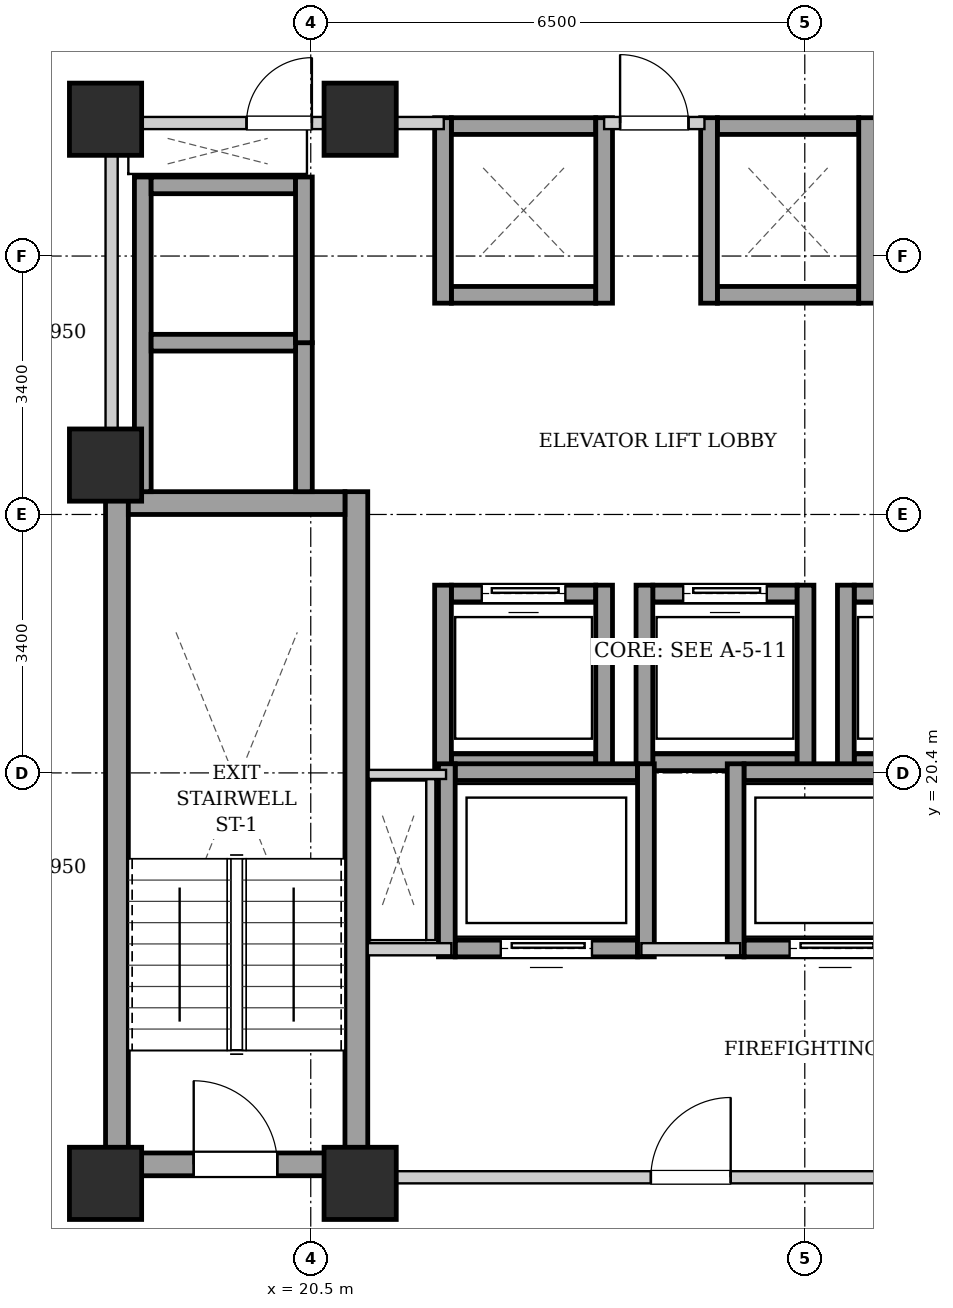
"""IFC4 building model, lengths in metres.
Left out: names, types, materials, properties, quantities, classifications, styles, units other than length and angle.
Written with IfcOpenShell. Run it as: python <this file> out.ifc"""

import sys

from ifc_helpers import new_model, si_unit, direction, frame, frame_2d, origin, origin_2d, place, context, subcontext, project, spatial, rectangle, extrude, element, fill, save


model = new_model("IFC4")
c1 = context("Model", 3, precision=1e-05, world=origin(), true_north=direction((0.0, 1.0)))
c2 = subcontext(c1, "Body", "Model", "MODEL_VIEW")
j1 = project(units=[si_unit("LENGTHUNIT", "METRE"), si_unit("PLANEANGLEUNIT", "RADIAN")], contexts=[c1])
p1 = place(None, origin())
s1 = spatial("IfcSite", under=j1, at=p1, CompositionType="ELEMENT")
p2 = place(p1, origin())
s2 = spatial("IfcBuilding", under=s1, at=p2, CompositionType="ELEMENT")
p3 = place(p2, frame((0.0, 0.0, 127.65)))
s3 = spatial("IfcBuildingStorey", under=s2, at=p3, CompositionType="ELEMENT", Elevation=127.65)
for number, where, z_axis, x_axis in (
    (1, (17.8, 15.0, 0.0), (0.0, 0.0, 1.0), (1.0, 0.0, 0.0)),
    (2, (21.15, 15.0, 0.0), (0.0, 0.0, 1.0), (1.0, 0.0, 0.0)),
    (3, (17.8, 29.0, 0.0), (0.0, 0.0, 1.0), (1.0, 0.0, 0.0)),
    (4, (21.15, 29.0, 0.0), (0.0, 0.0, 1.0), (1.0, 0.0, 0.0)),
    (5, (17.8, 24.45, 0.0), (0.0, 0.0, 1.0), (1.0, 0.0, 0.0)),
):
    element("IfcColumn", number, at=place(p3, frame(where, z_axis=z_axis, x_axis=x_axis)), inside=s3, PredefinedType="COLUMN", context=c2, shape_type="SweptSolid", body=[
        extrude(rectangle(XDim=0.95, YDim=0.95, at=origin_2d()), origin(), (0.0, 0.0, 1.0), 3.25),
    ])
for number, where, z_axis, x_axis in (
    (6, (17.95, 15.1, 0.0), (0.0, 0.0, 1.0), (0.0, 1.0, 0.0)),
    (7, (21.1, 15.1, 0.0), (0.0, 0.0, 1.0), (0.0, 1.0, 0.0)),
):
    element("IfcWall", number, at=place(p3, frame(where, z_axis=z_axis, x_axis=x_axis)), inside=s3, PredefinedType="SHEAR", context=c2, shape_type="SweptSolid", body=[
        extrude(rectangle(XDim=9.0, YDim=0.3, at=frame_2d((4.5, 0.0))), origin(), (0.0, 0.0, 1.0), 2.99),
    ])
p4 = place(p3, frame((18.1, 23.95, 0.0), z_axis=(0.0, 0.0, 1.0), x_axis=(1.0, 0.0, 0.0)))
e8 = element("IfcWall", 8, at=p4, inside=s3, PredefinedType="SHEAR", context=c2, shape_type="SweptSolid", body=[
    extrude(rectangle(XDim=2.85, YDim=0.3, at=frame_2d((1.425, 0.0))), origin(), (0.0, 0.0, 1.0), 2.99),
])
p5 = place(p3, frame((18.1, 15.25, 0.0), z_axis=(0.0, 0.0, 1.0), x_axis=(1.0, 0.0, 0.0)))
e9 = element("IfcWall", 9, at=p5, inside=s3, PredefinedType="SHEAR", context=c2, shape_type="SweptSolid", body=[
    extrude(rectangle(XDim=2.85, YDim=0.3, at=frame_2d((1.425, 0.0))), origin(), (0.0, 0.0, 1.0), 2.99),
])
p6 = place(p5, frame((0.86, 0.0, 0.0)))
e10 = element("IfcOpeningElement", 10, at=p6, cuts=e9, PredefinedType="OPENING", context=c2, shape_type="SweptSolid", body=[
    extrude(rectangle(XDim=1.1, YDim=2.05, at=frame_2d((0.55, 1.025))), frame((0.0, 0.16, 0.0), z_axis=(0.0, -1.0, 0.0), x_axis=(1.0, 0.0, 0.0)), (0.0, 0.0, 1.0), 0.32),
])
for number, where, z_axis, x_axis in (
    (11, (22.35, 26.69, 0.0), (0.0, 0.0, 1.0), (1.0, 0.0, 0.0)),
    (12, (22.35, 28.91, 0.0), (0.0, 0.0, 1.0), (1.0, 0.0, 0.0)),
):
    element("IfcWall", number, at=place(p3, frame(where, z_axis=z_axis, x_axis=x_axis)), inside=s3, PredefinedType="SHEAR", context=c2, shape_type="SweptSolid", body=[
        extrude(rectangle(XDim=1.9, YDim=0.22, at=frame_2d((0.95, 0.0))), origin(), (0.0, 0.0, 1.0), 2.99),
    ])
for number, where, z_axis, x_axis in (
    (13, (22.24, 26.58, 0.0), (0.0, 0.0, 1.0), (0.0, 1.0, 0.0)),
    (14, (24.36, 26.58, 0.0), (0.0, 0.0, 1.0), (0.0, 1.0, 0.0)),
):
    element("IfcWall", number, at=place(p3, frame(where, z_axis=z_axis, x_axis=x_axis)), inside=s3, PredefinedType="SHEAR", context=c2, shape_type="SweptSolid", body=[
        extrude(rectangle(XDim=2.44, YDim=0.22, at=frame_2d((1.22, 0.0))), origin(), (0.0, 0.0, 1.0), 2.99),
    ])
for number, where, z_axis, x_axis in (
    (15, (25.85, 26.69, 0.0), (0.0, 0.0, 1.0), (1.0, 0.0, 0.0)),
    (16, (25.85, 28.91, 0.0), (0.0, 0.0, 1.0), (1.0, 0.0, 0.0)),
):
    element("IfcWall", number, at=place(p3, frame(where, z_axis=z_axis, x_axis=x_axis)), inside=s3, PredefinedType="SHEAR", context=c2, shape_type="SweptSolid", body=[
        extrude(rectangle(XDim=1.86, YDim=0.22, at=frame_2d((0.93, 0.0))), origin(), (0.0, 0.0, 1.0), 2.99),
    ])
for number, where, z_axis, x_axis in (
    (17, (25.74, 26.58, 0.0), (0.0, 0.0, 1.0), (0.0, 1.0, 0.0)),
    (18, (27.82, 26.58, 0.0), (0.0, 0.0, 1.0), (0.0, 1.0, 0.0)),
):
    element("IfcWall", number, at=place(p3, frame(where, z_axis=z_axis, x_axis=x_axis)), inside=s3, PredefinedType="SHEAR", context=c2, shape_type="SweptSolid", body=[
        extrude(rectangle(XDim=2.44, YDim=0.22, at=frame_2d((1.22, 0.0))), origin(), (0.0, 0.0, 1.0), 2.99),
    ])
p7 = place(p3, frame((22.35, 20.54, 0.0), z_axis=(0.0, 0.0, 1.0), x_axis=(1.0, 0.0, 0.0)))
e19 = element("IfcWall", 19, at=p7, inside=s3, PredefinedType="SHEAR", context=c2, shape_type="SweptSolid", body=[
    extrude(rectangle(XDim=1.9, YDim=0.22, at=frame_2d((0.95, 0.0))), origin(), (0.0, 0.0, 1.0), 2.99),
])
p8 = place(p3, frame((22.35, 22.76, 0.0), z_axis=(0.0, 0.0, 1.0), x_axis=(1.0, 0.0, 0.0)))
e20 = element("IfcWall", 20, at=p8, inside=s3, PredefinedType="SHEAR", context=c2, shape_type="SweptSolid", body=[
    extrude(rectangle(XDim=1.9, YDim=0.22, at=frame_2d((0.95, 0.0))), origin(), (0.0, 0.0, 1.0), 2.99),
])
p9 = place(p8, frame((0.4, 0.0, 0.0)))
e21 = element("IfcOpeningElement", 21, at=p9, cuts=e20, PredefinedType="OPENING", context=c2, shape_type="SweptSolid", body=[
    extrude(rectangle(XDim=1.1, YDim=2.15, at=frame_2d((0.55, 1.075))), frame((0.0, 0.12, 0.0), z_axis=(0.0, -1.0, 0.0), x_axis=(1.0, 0.0, 0.0)), (0.0, 0.0, 1.0), 0.24),
])
for number, where, z_axis, x_axis in (
    (22, (22.24, 20.43, 0.0), (0.0, 0.0, 1.0), (0.0, 1.0, 0.0)),
    (23, (24.36, 20.43, 0.0), (0.0, 0.0, 1.0), (0.0, 1.0, 0.0)),
):
    element("IfcWall", number, at=place(p3, frame(where, z_axis=z_axis, x_axis=x_axis)), inside=s3, PredefinedType="SHEAR", context=c2, shape_type="SweptSolid", body=[
        extrude(rectangle(XDim=2.44, YDim=0.22, at=frame_2d((1.22, 0.0))), origin(), (0.0, 0.0, 1.0), 2.99),
    ])
p10 = place(p3, frame((25.0, 20.54, 0.0), z_axis=(0.0, 0.0, 1.0), x_axis=(1.0, 0.0, 0.0)))
e24 = element("IfcWall", 24, at=p10, inside=s3, PredefinedType="SHEAR", context=c2, shape_type="SweptSolid", body=[
    extrude(rectangle(XDim=1.9, YDim=0.22, at=frame_2d((0.95, 0.0))), origin(), (0.0, 0.0, 1.0), 2.99),
])
p11 = place(p3, frame((25.0, 22.76, 0.0), z_axis=(0.0, 0.0, 1.0), x_axis=(1.0, 0.0, 0.0)))
e25 = element("IfcWall", 25, at=p11, inside=s3, PredefinedType="SHEAR", context=c2, shape_type="SweptSolid", body=[
    extrude(rectangle(XDim=1.9, YDim=0.22, at=frame_2d((0.95, 0.0))), origin(), (0.0, 0.0, 1.0), 2.99),
])
p12 = place(p11, frame((0.4, 0.0, 0.0)))
e26 = element("IfcOpeningElement", 26, at=p12, cuts=e25, PredefinedType="OPENING", context=c2, shape_type="SweptSolid", body=[
    extrude(rectangle(XDim=1.1, YDim=2.15, at=frame_2d((0.55, 1.075))), frame((0.0, 0.12, 0.0), z_axis=(0.0, -1.0, 0.0), x_axis=(1.0, 0.0, 0.0)), (0.0, 0.0, 1.0), 0.24),
])
for number, where, z_axis, x_axis in (
    (27, (24.89, 20.43, 0.0), (0.0, 0.0, 1.0), (0.0, 1.0, 0.0)),
    (28, (27.01, 20.43, 0.0), (0.0, 0.0, 1.0), (0.0, 1.0, 0.0)),
):
    element("IfcWall", number, at=place(p3, frame(where, z_axis=z_axis, x_axis=x_axis)), inside=s3, PredefinedType="SHEAR", context=c2, shape_type="SweptSolid", body=[
        extrude(rectangle(XDim=2.44, YDim=0.22, at=frame_2d((1.22, 0.0))), origin(), (0.0, 0.0, 1.0), 2.99),
    ])
p13 = place(p3, frame((27.65, 20.54, 0.0), z_axis=(0.0, 0.0, 1.0), x_axis=(1.0, 0.0, 0.0)))
e29 = element("IfcWall", 29, at=p13, inside=s3, PredefinedType="SHEAR", context=c2, shape_type="SweptSolid", body=[
    extrude(rectangle(XDim=1.9, YDim=0.22, at=frame_2d((0.95, 0.0))), origin(), (0.0, 0.0, 1.0), 2.99),
])
p14 = place(p3, frame((27.65, 22.76, 0.0), z_axis=(0.0, 0.0, 1.0), x_axis=(1.0, 0.0, 0.0)))
e30 = element("IfcWall", 30, at=p14, inside=s3, PredefinedType="SHEAR", context=c2, shape_type="SweptSolid", body=[
    extrude(rectangle(XDim=1.9, YDim=0.22, at=frame_2d((0.95, 0.0))), origin(), (0.0, 0.0, 1.0), 2.99),
])
p15 = place(p14, frame((0.4, 0.0, 0.0)))
e31 = element("IfcOpeningElement", 31, at=p15, cuts=e30, PredefinedType="OPENING", context=c2, shape_type="SweptSolid", body=[
    extrude(rectangle(XDim=1.1, YDim=2.15, at=frame_2d((0.55, 1.075))), frame((0.0, 0.12, 0.0), z_axis=(0.0, -1.0, 0.0), x_axis=(1.0, 0.0, 0.0)), (0.0, 0.0, 1.0), 0.24),
])
p16 = place(p3, frame((27.54, 20.43, 0.0), z_axis=(0.0, 0.0, 1.0), x_axis=(0.0, 1.0, 0.0)))
e32 = element("IfcWall", 32, at=p16, inside=s3, PredefinedType="SHEAR", context=c2, shape_type="SweptSolid", body=[
    extrude(rectangle(XDim=2.44, YDim=0.22, at=frame_2d((1.22, 0.0))), origin(), (0.0, 0.0, 1.0), 2.99),
])
p17 = place(p3, frame((18.29, 24.1, 0.0), z_axis=(0.0, 0.0, 1.0), x_axis=(0.0, 1.0, 0.0)))
e33 = element("IfcWall", 33, at=p17, inside=s3, PredefinedType="SHEAR", context=c2, shape_type="SweptSolid", body=[
    extrude(rectangle(XDim=4.14, YDim=0.22, at=frame_2d((2.07, 0.0))), origin(), (0.0, 0.0, 1.0), 2.99),
])
p18 = place(p3, frame((20.41, 24.1, 0.0), z_axis=(0.0, 0.0, 1.0), x_axis=(0.0, 1.0, 0.0)))
e34 = element("IfcWall", 34, at=p18, inside=s3, PredefinedType="SHEAR", context=c2, shape_type="SweptSolid", body=[
    extrude(rectangle(XDim=1.96, YDim=0.22, at=frame_2d((0.98, 0.0))), origin(), (0.0, 0.0, 1.0), 2.99),
])
for number, where, z_axis, x_axis in (
    (35, (18.4, 26.06, 0.0), (0.0, 0.0, 1.0), (1.0, 0.0, 0.0)),
    (36, (18.4, 28.13, 0.0), (0.0, 0.0, 1.0), (1.0, 0.0, 0.0)),
):
    element("IfcWall", number, at=place(p3, frame(where, z_axis=z_axis, x_axis=x_axis)), inside=s3, PredefinedType="SHEAR", context=c2, shape_type="SweptSolid", body=[
        extrude(rectangle(XDim=1.9, YDim=0.22, at=frame_2d((0.95, 0.0))), origin(), (0.0, 0.0, 1.0), 2.99),
    ])
p19 = place(p3, frame((20.41, 26.06, 0.0), z_axis=(0.0, 0.0, 1.0), x_axis=(0.0, 1.0, 0.0)))
e37 = element("IfcWall", 37, at=p19, inside=s3, PredefinedType="SHEAR", context=c2, shape_type="SweptSolid", body=[
    extrude(rectangle(XDim=2.18, YDim=0.22, at=frame_2d((1.09, 0.0))), origin(), (0.0, 0.0, 1.0), 2.99),
])
p20 = place(p3, frame((22.4, 18.09, 0.0), z_axis=(0.0, 0.0, 1.0), x_axis=(1.0, 0.0, 0.0)))
e38 = element("IfcWall", 38, at=p20, inside=s3, PredefinedType="SHEAR", context=c2, shape_type="SweptSolid", body=[
    extrude(rectangle(XDim=2.4, YDim=0.22, at=frame_2d((1.2, 0.0))), origin(), (0.0, 0.0, 1.0), 2.99),
])
p21 = place(p20, frame((0.6, 0.0, 0.0)))
e39 = element("IfcOpeningElement", 39, at=p21, cuts=e38, PredefinedType="OPENING", context=c2, shape_type="SweptSolid", body=[
    extrude(rectangle(XDim=1.2, YDim=2.15, at=frame_2d((0.6, 1.075))), frame((0.0, 0.12, 0.0), z_axis=(0.0, -1.0, 0.0), x_axis=(1.0, 0.0, 0.0)), (0.0, 0.0, 1.0), 0.24),
])
p22 = place(p3, frame((22.4, 20.41, 0.0), z_axis=(0.0, 0.0, 1.0), x_axis=(1.0, 0.0, 0.0)))
e40 = element("IfcWall", 40, at=p22, inside=s3, PredefinedType="SHEAR", context=c2, shape_type="SweptSolid", body=[
    extrude(rectangle(XDim=2.4, YDim=0.22, at=frame_2d((1.2, 0.0))), origin(), (0.0, 0.0, 1.0), 2.99),
])
for number, where, z_axis, x_axis in (
    (41, (22.29, 17.98, 0.0), (0.0, 0.0, 1.0), (0.0, 1.0, 0.0)),
    (42, (24.91, 17.98, 0.0), (0.0, 0.0, 1.0), (0.0, 1.0, 0.0)),
):
    element("IfcWall", number, at=place(p3, frame(where, z_axis=z_axis, x_axis=x_axis)), inside=s3, PredefinedType="SHEAR", context=c2, shape_type="SweptSolid", body=[
        extrude(rectangle(XDim=2.54, YDim=0.22, at=frame_2d((1.27, 0.0))), origin(), (0.0, 0.0, 1.0), 2.99),
    ])
p23 = place(p3, frame((26.2, 18.09, 0.0), z_axis=(0.0, 0.0, 1.0), x_axis=(1.0, 0.0, 0.0)))
e43 = element("IfcWall", 43, at=p23, inside=s3, PredefinedType="SHEAR", context=c2, shape_type="SweptSolid", body=[
    extrude(rectangle(XDim=2.4, YDim=0.22, at=frame_2d((1.2, 0.0))), origin(), (0.0, 0.0, 1.0), 2.99),
])
p24 = place(p23, frame((0.6, 0.0, 0.0)))
e44 = element("IfcOpeningElement", 44, at=p24, cuts=e43, PredefinedType="OPENING", context=c2, shape_type="SweptSolid", body=[
    extrude(rectangle(XDim=1.2, YDim=2.15, at=frame_2d((0.6, 1.075))), frame((0.0, 0.12, 0.0), z_axis=(0.0, -1.0, 0.0), x_axis=(1.0, 0.0, 0.0)), (0.0, 0.0, 1.0), 0.24),
])
p25 = place(p3, frame((26.2, 20.41, 0.0), z_axis=(0.0, 0.0, 1.0), x_axis=(1.0, 0.0, 0.0)))
e45 = element("IfcWall", 45, at=p25, inside=s3, PredefinedType="SHEAR", context=c2, shape_type="SweptSolid", body=[
    extrude(rectangle(XDim=2.4, YDim=0.22, at=frame_2d((1.2, 0.0))), origin(), (0.0, 0.0, 1.0), 2.99),
])
p26 = place(p3, frame((26.09, 17.98, 0.0), z_axis=(0.0, 0.0, 1.0), x_axis=(0.0, 1.0, 0.0)))
e46 = element("IfcWall", 46, at=p26, inside=s3, PredefinedType="SHEAR", context=c2, shape_type="SweptSolid", body=[
    extrude(rectangle(XDim=2.54, YDim=0.22, at=frame_2d((1.27, 0.0))), origin(), (0.0, 0.0, 1.0), 2.99),
])
p27 = place(p3, frame((21.25, 15.08, 0.0), z_axis=(0.0, 0.0, 1.0), x_axis=(1.0, 0.0, 0.0)))
e47 = element("IfcWall", 47, at=p27, inside=s3, PredefinedType="PARTITIONING", context=c2, shape_type="SweptSolid", body=[
    extrude(rectangle(XDim=8.5, YDim=0.16, at=frame_2d((4.25, 0.0))), origin(), (0.0, 0.0, 1.0), 2.426),
])
p28 = place(p27, frame((3.725, 0.0, 0.0)))
e48 = element("IfcOpeningElement", 48, at=p28, cuts=e47, PredefinedType="OPENING", context=c2, shape_type="SweptSolid", body=[
    extrude(rectangle(XDim=1.05, YDim=2.05, at=frame_2d((0.525, 1.025))), frame((0.0, 0.09, 0.0), z_axis=(0.0, -1.0, 0.0), x_axis=(1.0, 0.0, 0.0)), (0.0, 0.0, 1.0), 0.18),
])
p29 = place(p3, frame((21.25, 18.08, 0.0), z_axis=(0.0, 0.0, 1.0), x_axis=(1.0, 0.0, 0.0)))
e49 = element("IfcWall", 49, at=p29, inside=s3, PredefinedType="PARTITIONING", context=c2, shape_type="SweptSolid", body=[
    extrude(rectangle(XDim=1.1, YDim=0.16, at=frame_2d((0.55, 0.0))), origin(), (0.0, 0.0, 1.0), 2.99),
])
p30 = place(p3, frame((24.85, 18.08, 0.0), z_axis=(0.0, 0.0, 1.0), x_axis=(1.0, 0.0, 0.0)))
e50 = element("IfcWall", 50, at=p30, inside=s3, PredefinedType="PARTITIONING", context=c2, shape_type="SweptSolid", body=[
    extrude(rectangle(XDim=1.3, YDim=0.16, at=frame_2d((0.65, 0.0))), origin(), (0.0, 0.0, 1.0), 2.99),
])
p31 = place(p3, frame((17.88, 24.12, 0.0), z_axis=(0.0, 0.0, 1.0), x_axis=(0.0, 1.0, 0.0)))
e51 = element("IfcWall", 51, at=p31, inside=s3, PredefinedType="PARTITIONING", context=c2, shape_type="SweptSolid", body=[
    extrude(rectangle(XDim=4.76, YDim=0.16, at=frame_2d((2.38, 0.0))), origin(), (0.0, 0.0, 1.0), 2.325),
])
p32 = place(p3, frame((24.36, 28.95, 0.0), z_axis=(0.0, 0.0, 1.0), x_axis=(1.0, 0.0, 0.0)))
e52 = element("IfcWall", 52, at=p32, inside=s3, PredefinedType="PARTITIONING", context=c2, shape_type="SweptSolid", body=[
    extrude(rectangle(XDim=1.32, YDim=0.16, at=frame_2d((0.66, 0.0))), origin(), (0.0, 0.0, 1.0), 2.426),
])
p33 = place(p32, frame((0.21, 0.0, 0.0)))
e53 = element("IfcOpeningElement", 53, at=p33, cuts=e52, PredefinedType="OPENING", context=c2, shape_type="SweptSolid", body=[
    extrude(rectangle(XDim=0.9, YDim=2.05, at=frame_2d((0.45, 1.025))), frame((0.0, 0.09, 0.0), z_axis=(0.0, -1.0, 0.0), x_axis=(1.0, 0.0, 0.0)), (0.0, 0.0, 1.0), 0.18),
])
p34 = place(p3, frame((17.96, 28.95, 0.0), z_axis=(0.0, 0.0, 1.0), x_axis=(1.0, 0.0, 0.0)))
e54 = element("IfcWall", 54, at=p34, inside=s3, PredefinedType="PARTITIONING", context=c2, shape_type="SweptSolid", body=[
    extrude(rectangle(XDim=4.29, YDim=0.16, at=frame_2d((2.145, 0.0))), origin(), (0.0, 0.0, 1.0), 2.426),
])
p35 = place(p34, frame((1.695, 0.0, 0.0)))
e55 = element("IfcOpeningElement", 55, at=p35, cuts=e54, PredefinedType="OPENING", context=c2, shape_type="SweptSolid", body=[
    extrude(rectangle(XDim=0.86, YDim=2.05, at=frame_2d((0.43, 1.025))), frame((0.0, 0.09, 0.0), z_axis=(0.0, -1.0, 0.0), x_axis=(1.0, 0.0, 0.0)), (0.0, 0.0, 1.0), 0.18),
])
p36 = place(p3, frame((22.08, 18.2, 0.0), z_axis=(0.0, 0.0, 1.0), x_axis=(0.0, 1.0, 0.0)))
e56 = element("IfcWall", 56, at=p36, inside=s3, PredefinedType="PARTITIONING", context=c2, shape_type="SweptSolid", body=[
    extrude(rectangle(XDim=2.12, YDim=0.12, at=frame_2d((1.06, 0.0))), origin(), (0.0, 0.0, 1.0), 2.99),
])
p37 = place(p3, frame((22.28, 20.38, 0.0), z_axis=(0.0, 0.0, 1.0), x_axis=(-1.0, 0.0, 0.0)))
e57 = element("IfcWall", 57, at=p37, inside=s3, PredefinedType="PARTITIONING", context=c2, shape_type="SweptSolid", body=[
    extrude(rectangle(XDim=1.02, YDim=0.12, at=frame_2d((0.51, 0.0))), origin(), (0.0, 0.0, 1.0), 2.99),
])
p38 = place(p6, origin())
e58 = element("IfcDoor", 58, at=p38, inside=s3, OperationType="SINGLE_SWING_LEFT", PredefinedType="DOOR", context=c2, shape_type="SweptSolid", body=[
    extrude(rectangle(XDim=1.1, YDim=2.05, at=frame_2d((0.55, 1.025))), frame((0.0, 0.025, 0.0), z_axis=(0.0, -1.0, 0.0), x_axis=(1.0, 0.0, 0.0)), (0.0, 0.0, 1.0), 0.05),
])
fill(e10, e58)
p39 = place(p9, origin())
e59 = element("IfcDoor", 59, at=p39, inside=s3, OperationType="SLIDING_TO_LEFT", PredefinedType="DOOR", context=c2, shape_type="SweptSolid", body=[
    extrude(rectangle(XDim=1.1, YDim=2.15, at=frame_2d((0.55, 1.075))), frame((0.0, 0.025, 0.0), z_axis=(0.0, -1.0, 0.0), x_axis=(1.0, 0.0, 0.0)), (0.0, 0.0, 1.0), 0.05),
])
fill(e21, e59)
p40 = place(p12, origin())
e60 = element("IfcDoor", 60, at=p40, inside=s3, OperationType="SLIDING_TO_LEFT", PredefinedType="DOOR", context=c2, shape_type="SweptSolid", body=[
    extrude(rectangle(XDim=1.1, YDim=2.15, at=frame_2d((0.55, 1.075))), frame((0.0, 0.025, 0.0), z_axis=(0.0, -1.0, 0.0), x_axis=(1.0, 0.0, 0.0)), (0.0, 0.0, 1.0), 0.05),
])
fill(e26, e60)
p41 = place(p21, origin())
e61 = element("IfcDoor", 61, at=p41, inside=s3, OperationType="SLIDING_TO_LEFT", PredefinedType="DOOR", context=c2, shape_type="SweptSolid", body=[
    extrude(rectangle(XDim=1.2, YDim=2.15, at=frame_2d((0.6, 1.075))), frame((0.0, 0.025, 0.0), z_axis=(0.0, -1.0, 0.0), x_axis=(1.0, 0.0, 0.0)), (0.0, 0.0, 1.0), 0.05),
])
fill(e39, e61)
p42 = place(p24, origin())
e62 = element("IfcDoor", 62, at=p42, inside=s3, OperationType="SLIDING_TO_LEFT", PredefinedType="DOOR", context=c2, shape_type="SweptSolid", body=[
    extrude(rectangle(XDim=1.2, YDim=2.15, at=frame_2d((0.6, 1.075))), frame((0.0, 0.025, 0.0), z_axis=(0.0, -1.0, 0.0), x_axis=(1.0, 0.0, 0.0)), (0.0, 0.0, 1.0), 0.05),
])
fill(e44, e62)
p43 = place(p28, origin())
e63 = element("IfcDoor", 63, at=p43, inside=s3, OperationType="SINGLE_SWING_RIGHT", PredefinedType="DOOR", context=c2, shape_type="SweptSolid", body=[
    extrude(rectangle(XDim=1.05, YDim=2.05, at=frame_2d((0.525, 1.025))), frame((0.0, 0.025, 0.0), z_axis=(0.0, -1.0, 0.0), x_axis=(1.0, 0.0, 0.0)), (0.0, 0.0, 1.0), 0.05),
])
fill(e48, e63)
p44 = place(p33, origin())
e64 = element("IfcDoor", 64, at=p44, inside=s3, OperationType="SINGLE_SWING_LEFT", PredefinedType="DOOR", context=c2, shape_type="SweptSolid", body=[
    extrude(rectangle(XDim=0.9, YDim=2.05, at=frame_2d((0.45, 1.025))), frame((0.0, 0.025, 0.0), z_axis=(0.0, -1.0, 0.0), x_axis=(1.0, 0.0, 0.0)), (0.0, 0.0, 1.0), 0.05),
])
fill(e53, e64)
p45 = place(p35, origin())
e65 = element("IfcDoor", 65, at=p45, inside=s3, OperationType="SINGLE_SWING_RIGHT", PredefinedType="DOOR", context=c2, shape_type="SweptSolid", body=[
    extrude(rectangle(XDim=0.86, YDim=2.05, at=frame_2d((0.43, 1.025))), frame((0.0, 0.025, 0.0), z_axis=(0.0, -1.0, 0.0), x_axis=(1.0, 0.0, 0.0)), (0.0, 0.0, 1.0), 0.05),
])
fill(e55, e65)
save(model, sys.argv[1])
